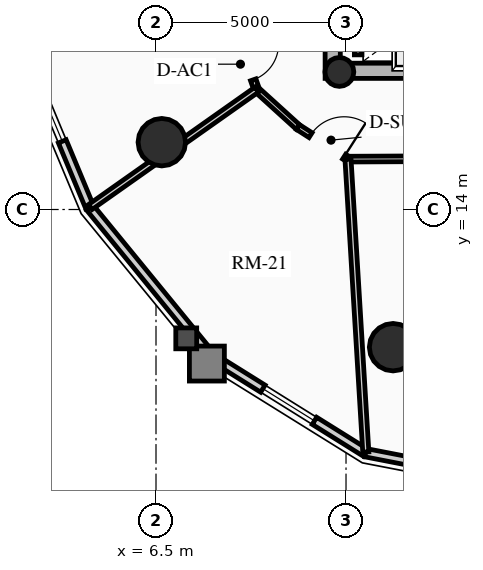
"""IFC4 building model, lengths in metres.
Left out: names, types, materials, properties, quantities, classifications, styles, units other than length and angle.
Written with IfcOpenShell. Run it as: python <this file> out.ifc"""

import sys

from ifc_helpers import new_model, si_unit, direction, frame, frame_2d, origin, origin_2d, place, context, subcontext, project, spatial, rectangle, circle, hollow_circle, extrude, source, transform, mapped, element, fill, save


model = new_model("IFC4")
c1 = context("Model", 3, precision=1e-05, world=origin(), true_north=direction((0.0, 1.0)))
c2 = subcontext(c1, "Body", "Model", "MODEL_VIEW")
j1 = project(units=[si_unit("LENGTHUNIT", "METRE"), si_unit("PLANEANGLEUNIT", "RADIAN")], contexts=[c1])
p1 = place(None, origin())
s1 = spatial("IfcSite", under=j1, at=p1, CompositionType="ELEMENT")
p2 = place(p1, origin())
s2 = spatial("IfcBuilding", under=s1, at=p2, CompositionType="ELEMENT")
p3 = place(p2, frame((0.0, 0.0, 151.6)))
s3 = spatial("IfcBuildingStorey", under=s2, at=p3, CompositionType="ELEMENT", Elevation=151.6)
p4 = place(p3, frame((11.15, 17.45, 0.0), z_axis=(0.0, 0.0, 1.0), x_axis=(0.0, 1.0, 0.0)))
e1 = element("IfcWall", 1, at=p4, inside=s3, PredefinedType="SHEAR", context=c2, shape_type="SweptSolid", body=[
    extrude(rectangle(XDim=14.1, YDim=0.4, at=frame_2d((7.05, 0.0))), origin(), (0.0, 0.0, 1.0), 2.91),
])
p5 = place(p3, frame((11.15, 17.65, 0.0), z_axis=(0.0, 0.0, 1.0), x_axis=(1.0, 0.0, 0.0)))
e2 = element("IfcWall", 2, at=p5, inside=s3, PredefinedType="SHEAR", context=c2, shape_type="SweptSolid", body=[
    extrude(rectangle(XDim=10.7, YDim=0.4, at=frame_2d((5.35, 0.0))), origin(), (0.0, 0.0, 1.0), 2.91),
])
m1 = source(origin(), c2, "Body", "SweptSolid", [
    extrude(rectangle(XDim=1.5, YDim=2.02, at=frame_2d((0.75, 1.01))), frame((0.0, 0.21, 0.0), z_axis=(0.0, -1.0, 0.0), x_axis=(1.0, 0.0, 0.0)), (0.0, 0.0, 1.0), 0.42),
])
p6 = place(p5, frame((5.45, 0.0, 0.0)))
e3 = element("IfcOpeningElement", 3, at=p6, cuts=e2, PredefinedType="OPENING", context=c2, shape_type="MappedRepresentation", body=[
    mapped(m1, transform((0.0, 0.0, 0.0), x_axis=(1.0, 0.0, 0.0), y_axis=(0.0, 1.0, 0.0), z_axis=(0.0, 0.0, 1.0), scale=1.0)),
])
p7 = place(p3, frame((11.325, 17.62, 0.0), z_axis=(0.0, 0.0, 1.0), x_axis=(1.0, 0.0, 0.0)))
e4 = element("IfcColumn", 4, at=p7, inside=s3, PredefinedType="COLUMN", context=c2, shape_type="SweptSolid", body=[
    extrude(hollow_circle(Radius=0.38, WallThickness=0.032, at=origin_2d()), origin(), (0.0, 0.0, 1.0), 2.91),
])
for number, where, z_axis, x_axis in (
    (5, (6.653, 15.771, 0.0), (0.0, 0.0, 1.0), (1.0, 0.0, 0.0)),
    (6, (12.739, 10.377, 0.0), (0.0, 0.0, 1.0), (1.0, 0.0, 0.0)),
):
    element("IfcColumn", number, at=place(p3, frame(where, z_axis=z_axis, x_axis=x_axis)), inside=s3, PredefinedType="USERDEFINED", context=c2, shape_type="SweptSolid", body=[
        extrude(circle(Radius=0.625, at=origin_2d()), origin(), (0.0, 0.0, 1.0), 2.91),
    ])
p8 = place(p3, frame((4.757, 14.055, 0.0), z_axis=(0.0, 0.0, 1.0), x_axis=(-0.384259959969, 0.923224936386, 0.0)))
e7 = element("IfcWall", 7, at=p8, inside=s3, PredefinedType="SOLIDWALL", context=c2, shape_type="SweptSolid", body=[
    extrude(rectangle(XDim=5.365, YDim=0.22, at=frame_2d((2.683, 0.0))), origin(), (0.0, 0.0, 1.0), 2.245),
])
m2 = source(origin(), c2, "Body", "SweptSolid", [
    extrude(rectangle(XDim=1.6, YDim=1.3, at=frame_2d((0.8, 0.65))), frame((0.0, 0.12, 0.0), z_axis=(0.0, -1.0, 0.0), x_axis=(1.0, 0.0, 0.0)), (0.0, 0.0, 1.0), 0.24),
])
p9 = place(p8, frame((1.883, 0.0, 0.65)))
e8 = element("IfcOpeningElement", 8, at=p9, cuts=e7, PredefinedType="OPENING", context=c2, shape_type="MappedRepresentation", body=[
    mapped(m2, transform((0.0, 0.0, 0.0), x_axis=(1.0, 0.0, 0.0), y_axis=(0.0, 1.0, 0.0), z_axis=(0.0, 0.0, 1.0), scale=1.0)),
])
p10 = place(p3, frame((7.968, 10.124, 0.0), z_axis=(0.0, 0.0, 1.0), x_axis=(-0.632598524901, 0.774479894053, 0.0)))
e9 = element("IfcWall", 9, at=p10, inside=s3, PredefinedType="SOLIDWALL", context=c2, shape_type="SweptSolid", body=[
    extrude(rectangle(XDim=5.076, YDim=0.22, at=frame_2d((2.538, 0.0))), origin(), (0.0, 0.0, 1.0), 2.245),
])
p11 = place(p3, frame((12.015, 7.6, 0.0), z_axis=(0.0, 0.0, 1.0), x_axis=(-0.848452391194, 0.529271707044, 0.0)))
e10 = element("IfcWall", 10, at=p11, inside=s3, PredefinedType="SOLIDWALL", context=c2, shape_type="SweptSolid", body=[
    extrude(rectangle(XDim=4.769, YDim=0.22, at=frame_2d((2.385, 0.0))), origin(), (0.0, 0.0, 1.0), 2.245),
])
p12 = place(p11, frame((1.585, 0.0, 0.65)))
e11 = element("IfcOpeningElement", 11, at=p12, cuts=e10, PredefinedType="OPENING", context=c2, shape_type="MappedRepresentation", body=[
    mapped(m2, transform((0.0, 0.0, 0.0), x_axis=(1.0, 0.0, 0.0), y_axis=(0.0, 1.0, 0.0), z_axis=(0.0, 0.0, 1.0), scale=1.0)),
])
p13 = place(p3, frame((16.5, 6.73, 0.0), z_axis=(0.0, 0.0, 1.0), x_axis=(-0.981718699963, 0.190337579429, 0.0)))
e12 = element("IfcWall", 12, at=p13, inside=s3, PredefinedType="SOLIDWALL", context=c2, shape_type="SweptSolid", body=[
    extrude(rectangle(XDim=4.569, YDim=0.22, at=frame_2d((2.284, 0.0))), origin(), (0.0, 0.0, 1.0), 2.245),
])
p14 = place(p13, frame((1.484, 0.0, 0.65)))
e13 = element("IfcOpeningElement", 13, at=p14, cuts=e12, PredefinedType="OPENING", context=c2, shape_type="MappedRepresentation", body=[
    mapped(m2, transform((0.0, 0.0, 0.0), x_axis=(1.0, 0.0, 0.0), y_axis=(0.0, 1.0, 0.0), z_axis=(0.0, 0.0, 1.0), scale=1.0)),
])
p15 = place(p3, frame((11.82, 18.07, 0.0), z_axis=(0.0, 0.0, 1.0), x_axis=(0.0, 1.0, 0.0)))
e14 = element("IfcWall", 14, at=p15, inside=s3, PredefinedType="SHEAR", context=c2, shape_type="SweptSolid", body=[
    extrude(rectangle(XDim=1.635, YDim=0.2, at=frame_2d((0.817, 0.0))), origin(), (0.0, 0.0, 1.0), 2.91),
])
p16 = place(p3, frame((8.685, 18.469, 0.0), z_axis=(0.0, 0.0, 1.0), x_axis=(0.333415749461, -0.942779899028, 0.0)))
e15 = element("IfcWall", 15, at=p16, inside=s3, PredefinedType="PARTITIONING", context=c2, shape_type="SweptSolid", body=[
    extrude(rectangle(XDim=1.394, YDim=0.15, at=frame_2d((0.697, 0.0))), origin(), (0.0, 0.0, 1.0), 2.245),
])
m3 = source(origin(), c2, "Body", "SweptSolid", [
    extrude(rectangle(XDim=1.0, YDim=2.015, at=frame_2d((0.5, 1.007))), frame((0.0, 0.085, 0.0), z_axis=(0.0, -1.0, 0.0), x_axis=(1.0, 0.0, 0.0)), (0.0, 0.0, 1.0), 0.17),
])
p17 = place(p16, frame((0.12, 0.0, 0.0)))
e16 = element("IfcOpeningElement", 16, at=p17, cuts=e15, PredefinedType="OPENING", context=c2, shape_type="MappedRepresentation", body=[
    mapped(m3, transform((0.0, 0.0, 0.0), x_axis=(1.0, 0.0, 0.0), y_axis=(0.0, 1.0, 0.0), z_axis=(0.0, 0.0, 1.0), scale=1.0)),
])
p18 = place(p3, frame((9.15, 17.155, 0.0), z_axis=(0.0, 0.0, 1.0), x_axis=(0.740451494731, -0.672109800517, 0.0)))
e17 = element("IfcWall", 17, at=p18, inside=s3, PredefinedType="PARTITIONING", context=c2, shape_type="SweptSolid", body=[
    extrude(rectangle(XDim=1.468, YDim=0.15, at=frame_2d((0.734, 0.0))), origin(), (0.0, 0.0, 1.0), 2.245),
])
p19 = place(p3, frame((10.237, 16.168, 0.0), z_axis=(0.0, 0.0, 1.0), x_axis=(0.842061223587, -0.53938195718, 0.0)))
e18 = element("IfcWall", 18, at=p19, inside=s3, PredefinedType="PARTITIONING", context=c2, shape_type="SweptSolid", body=[
    extrude(rectangle(XDim=1.562, YDim=0.15, at=frame_2d((0.781, 0.0))), origin(), (0.0, 0.0, 1.0), 2.245),
])
m4 = source(origin(), c2, "Body", "SweptSolid", [
    extrude(rectangle(XDim=1.05, YDim=2.015, at=frame_2d((0.525, 1.007))), frame((0.0, 0.085, 0.0), z_axis=(0.0, -1.0, 0.0), x_axis=(1.0, 0.0, 0.0)), (0.0, 0.0, 1.0), 0.17),
])
p20 = place(p19, frame((0.392, 0.0, 0.0)))
e19 = element("IfcOpeningElement", 19, at=p20, cuts=e18, PredefinedType="OPENING", context=c2, shape_type="MappedRepresentation", body=[
    mapped(m4, transform((0.0, 0.0, 0.0), x_axis=(1.0, 0.0, 0.0), y_axis=(0.0, 1.0, 0.0), z_axis=(0.0, 0.0, 1.0), scale=1.0)),
])
p21 = place(p3, frame((11.552, 15.326, 0.0), z_axis=(0.0, 0.0, 1.0), x_axis=(0.999989573465, 0.004566504266, 0.0)))
e20 = element("IfcWall", 20, at=p21, inside=s3, PredefinedType="PARTITIONING", context=c2, shape_type="SweptSolid", body=[
    extrude(rectangle(XDim=3.261, YDim=0.15, at=frame_2d((1.631, 0.0))), origin(), (0.0, 0.0, 1.0), 2.245),
])
p22 = place(p3, frame((9.15, 17.155, 0.0), z_axis=(0.0, 0.0, 1.0), x_axis=(-0.81708911443, -0.576511386774, 0.0)))
e21 = element("IfcWall", 21, at=p22, inside=s3, PredefinedType="PARTITIONING", context=c2, shape_type="SweptSolid", body=[
    extrude(rectangle(XDim=5.356, YDim=0.16, at=frame_2d((2.678, 0.0))), origin(), (0.0, 0.0, 1.0), 2.245),
])
p23 = place(p3, frame((11.552, 15.326, 0.0), z_axis=(0.0, 0.0, 1.0), x_axis=(0.060740403573, -0.998153597085, 0.0)))
e22 = element("IfcWall", 22, at=p23, inside=s3, PredefinedType="PARTITIONING", context=c2, shape_type="SweptSolid", body=[
    extrude(rectangle(XDim=7.721, YDim=0.16, at=frame_2d((3.861, 0.0))), origin(), (0.0, 0.0, 1.0), 2.245),
])
m5 = source(origin(), c2, "Body", "SweptSolid", [
    extrude(rectangle(XDim=1.6, YDim=1.3, at=frame_2d((0.8, 0.65))), frame((0.0, 0.03, 0.0), z_axis=(0.0, -1.0, 0.0), x_axis=(1.0, 0.0, 0.0)), (0.0, 0.0, 1.0), 0.06),
])
p24 = place(p9, origin())
e23 = element("IfcWindow", 23, at=p24, inside=s3, PartitioningType="SINGLE_PANEL", PredefinedType="WINDOW", context=c2, shape_type="MappedRepresentation", body=[
    mapped(m5, transform((0.0, 0.0, 0.0), x_axis=(1.0, 0.0, 0.0), y_axis=(0.0, 1.0, 0.0), z_axis=(0.0, 0.0, 1.0), scale=1.0)),
])
fill(e8, e23)
p25 = place(p12, origin())
e24 = element("IfcWindow", 24, at=p25, inside=s3, PartitioningType="SINGLE_PANEL", PredefinedType="WINDOW", context=c2, shape_type="MappedRepresentation", body=[
    mapped(m5, transform((0.0, 0.0, 0.0), x_axis=(1.0, 0.0, 0.0), y_axis=(0.0, 1.0, 0.0), z_axis=(0.0, 0.0, 1.0), scale=1.0)),
])
fill(e11, e24)
m6 = source(origin(), c2, "Body", "SweptSolid", [
    extrude(rectangle(XDim=1.0, YDim=2.015, at=frame_2d((0.5, 1.007))), frame((0.0, 0.025, 0.0), z_axis=(0.0, -1.0, 0.0), x_axis=(1.0, 0.0, 0.0)), (0.0, 0.0, 1.0), 0.05),
])
p26 = place(p17, origin())
e25 = element("IfcDoor", 25, at=p26, inside=s3, OperationType="SINGLE_SWING_LEFT", PredefinedType="DOOR", context=c2, shape_type="MappedRepresentation", body=[
    mapped(m6, transform((0.0, 0.0, 0.0), x_axis=(1.0, 0.0, 0.0), y_axis=(0.0, 1.0, 0.0), z_axis=(0.0, 0.0, 1.0), scale=1.0)),
])
fill(e16, e25)
m7 = source(origin(), c2, "Body", "SweptSolid", [
    extrude(rectangle(XDim=1.05, YDim=2.015, at=frame_2d((0.525, 1.007))), frame((0.0, 0.025, 0.0), z_axis=(0.0, -1.0, 0.0), x_axis=(1.0, 0.0, 0.0)), (0.0, 0.0, 1.0), 0.05),
])
p27 = place(p20, origin())
e26 = element("IfcDoor", 26, at=p27, inside=s3, OperationType="SINGLE_SWING_RIGHT", PredefinedType="DOOR", context=c2, shape_type="MappedRepresentation", body=[
    mapped(m7, transform((0.0, 0.0, 0.0), x_axis=(1.0, 0.0, 0.0), y_axis=(0.0, 1.0, 0.0), z_axis=(0.0, 0.0, 1.0), scale=1.0)),
])
fill(e19, e26)
save(model, sys.argv[1])
